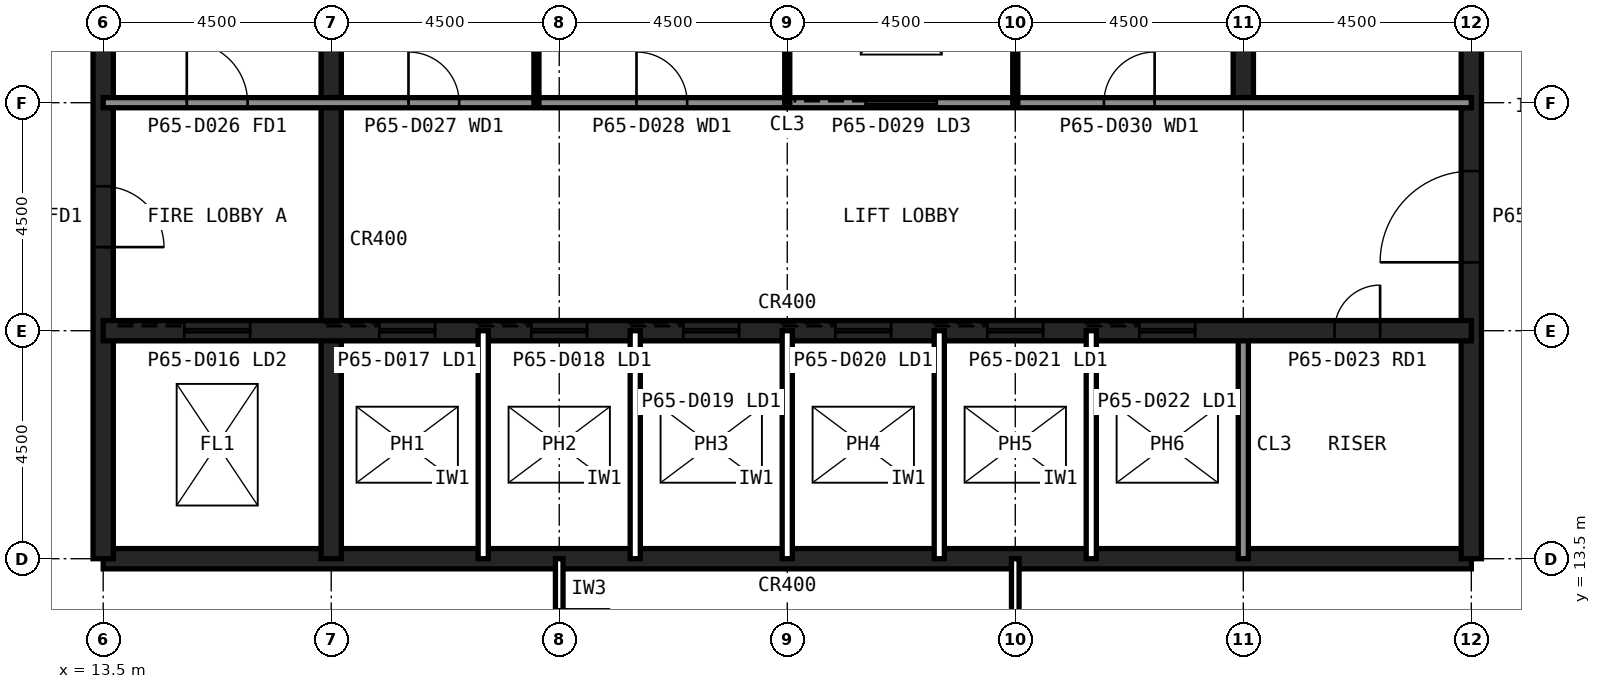
"""IFC4 building model, lengths in metres.
Left out: names, types, materials, properties, quantities, classifications, styles, units other than length and angle.
Written with IfcOpenShell. Run it as: python <this file> out.ifc"""

import sys

from ifc_helpers import new_model, si_unit, direction, frame, frame_2d, origin, place, context, subcontext, project, spatial, rectangle, extrude, element, fill, save


model = new_model("IFC4")
c1 = context("Model", 3, precision=1e-05, world=origin(), true_north=direction((0.0, 1.0)))
c2 = subcontext(c1, "Body", "Model", "MODEL_VIEW")
j1 = project(units=[si_unit("LENGTHUNIT", "METRE"), si_unit("PLANEANGLEUNIT", "RADIAN")], contexts=[c1])
p1 = place(None, origin())
s1 = spatial("IfcSite", under=j1, at=p1, CompositionType="ELEMENT")
p2 = place(p1, origin())
s2 = spatial("IfcBuilding", under=s1, at=p2, CompositionType="ELEMENT")
p3 = place(p2, frame((0.0, 0.0, 270.6)))
s3 = spatial("IfcBuildingStorey", under=s2, at=p3, CompositionType="ELEMENT", Elevation=270.6)
p4 = place(p3, frame((13.5, 13.5, 0.0), z_axis=(0.0, 0.0, 1.0), x_axis=(1.0, 0.0, 0.0)))
e1 = element("IfcWall", 1, at=p4, inside=s3, PredefinedType="SHEAR", context=c2, shape_type="SweptSolid", body=[
    extrude(rectangle(XDim=27.0, YDim=0.4, at=frame_2d((13.5, 0.0))), origin(), (0.0, 0.0, 1.0), 4.0),
])
p5 = place(p3, frame((40.5, 13.5, 0.0), z_axis=(0.0, 0.0, 1.0), x_axis=(0.0, 1.0, 0.0)))
e2 = element("IfcWall", 2, at=p5, inside=s3, PredefinedType="SHEAR", context=c2, shape_type="SweptSolid", body=[
    extrude(rectangle(XDim=27.0, YDim=0.4, at=frame_2d((13.5, 0.0))), origin(), (0.0, 0.0, 1.0), 4.0),
])
p6 = place(p5, frame((5.85, 0.0, 0.0)))
e3 = element("IfcOpeningElement", 3, at=p6, cuts=e2, PredefinedType="OPENING", context=c2, shape_type="SweptSolid", body=[
    extrude(rectangle(XDim=1.8, YDim=2.1, at=frame_2d((0.9, 1.05))), frame((0.0, 0.21, 0.0), z_axis=(0.0, -1.0, 0.0), x_axis=(1.0, 0.0, 0.0)), (0.0, 0.0, 1.0), 0.42),
])
p7 = place(p5, frame((19.65, 0.0, 0.0)))
e4 = element("IfcOpeningElement", 4, at=p7, cuts=e2, PredefinedType="OPENING", context=c2, shape_type="SweptSolid", body=[
    extrude(rectangle(XDim=1.2, YDim=2.1, at=frame_2d((0.6, 1.05))), frame((0.0, 0.21, 0.0), z_axis=(0.0, -1.0, 0.0), x_axis=(1.0, 0.0, 0.0)), (0.0, 0.0, 1.0), 0.42),
])
p8 = place(p3, frame((13.5, 40.5, 0.0), z_axis=(0.0, 0.0, 1.0), x_axis=(0.0, -1.0, 0.0)))
e5 = element("IfcWall", 5, at=p8, inside=s3, PredefinedType="SHEAR", context=c2, shape_type="SweptSolid", body=[
    extrude(rectangle(XDim=27.0, YDim=0.4, at=frame_2d((13.5, 0.0))), origin(), (0.0, 0.0, 1.0), 4.0),
])
p9 = place(p8, frame((19.65, 0.0, 0.0)))
e6 = element("IfcOpeningElement", 6, at=p9, cuts=e5, PredefinedType="OPENING", context=c2, shape_type="SweptSolid", body=[
    extrude(rectangle(XDim=1.2, YDim=2.1, at=frame_2d((0.6, 1.05))), frame((0.0, 0.21, 0.0), z_axis=(0.0, -1.0, 0.0), x_axis=(1.0, 0.0, 0.0)), (0.0, 0.0, 1.0), 0.42),
])
p10 = place(p8, frame((5.85, 0.0, 0.0)))
e7 = element("IfcOpeningElement", 7, at=p10, cuts=e5, PredefinedType="OPENING", context=c2, shape_type="SweptSolid", body=[
    extrude(rectangle(XDim=1.8, YDim=2.1, at=frame_2d((0.9, 1.05))), frame((0.0, 0.21, 0.0), z_axis=(0.0, -1.0, 0.0), x_axis=(1.0, 0.0, 0.0)), (0.0, 0.0, 1.0), 0.42),
])
p11 = place(p3, frame((18.0, 13.5, 0.0), z_axis=(0.0, 0.0, 1.0), x_axis=(0.0, 1.0, 0.0)))
e8 = element("IfcWall", 8, at=p11, inside=s3, PredefinedType="SHEAR", context=c2, shape_type="SweptSolid", body=[
    extrude(rectangle(XDim=18.0, YDim=0.4, at=frame_2d((9.0, 0.0))), origin(), (0.0, 0.0, 1.0), 4.0),
])
p12 = place(p3, frame((36.0, 13.5, 0.0), z_axis=(0.0, 0.0, 1.0), x_axis=(0.0, 1.0, 0.0)))
e9 = element("IfcWall", 9, at=p12, inside=s3, PredefinedType="SOLIDWALL", context=c2, shape_type="SweptSolid", body=[
    extrude(rectangle(XDim=4.5, YDim=0.2, at=frame_2d((2.25, 0.0))), origin(), (0.0, 0.0, 1.0), 3.84),
])
p13 = place(p3, frame((36.0, 22.5, 0.0), z_axis=(0.0, 0.0, 1.0), x_axis=(0.0, 1.0, 0.0)))
e10 = element("IfcWall", 10, at=p13, inside=s3, PredefinedType="SHEAR", context=c2, shape_type="SweptSolid", body=[
    extrude(rectangle(XDim=18.0, YDim=0.4, at=frame_2d((9.0, 0.0))), origin(), (0.0, 0.0, 1.0), 4.0),
])
p14 = place(p3, frame((13.5, 18.0, 0.0), z_axis=(0.0, 0.0, 1.0), x_axis=(1.0, 0.0, 0.0)))
e11 = element("IfcWall", 11, at=p14, inside=s3, PredefinedType="SHEAR", context=c2, shape_type="SweptSolid", body=[
    extrude(rectangle(XDim=27.0, YDim=0.4, at=frame_2d((13.5, 0.0))), origin(), (0.0, 0.0, 1.0), 4.0),
])
p15 = place(p14, frame((24.3, 0.0, 0.0)))
e12 = element("IfcOpeningElement", 12, at=p15, cuts=e11, PredefinedType="OPENING", context=c2, shape_type="SweptSolid", body=[
    extrude(rectangle(XDim=0.9, YDim=2.1, at=frame_2d((0.45, 1.05))), frame((0.0, 0.21, 0.0), z_axis=(0.0, -1.0, 0.0), x_axis=(1.0, 0.0, 0.0)), (0.0, 0.0, 1.0), 0.42),
])
p16 = place(p14, frame((5.45, 0.0, 0.0)))
e13 = element("IfcOpeningElement", 13, at=p16, cuts=e11, PredefinedType="OPENING", context=c2, shape_type="SweptSolid", body=[
    extrude(rectangle(XDim=1.1, YDim=2.1, at=frame_2d((0.55, 1.05))), frame((0.0, 0.21, 0.0), z_axis=(0.0, -1.0, 0.0), x_axis=(1.0, 0.0, 0.0)), (0.0, 0.0, 1.0), 0.42),
])
p17 = place(p14, frame((8.45, 0.0, 0.0)))
e14 = element("IfcOpeningElement", 14, at=p17, cuts=e11, PredefinedType="OPENING", context=c2, shape_type="SweptSolid", body=[
    extrude(rectangle(XDim=1.1, YDim=2.1, at=frame_2d((0.55, 1.05))), frame((0.0, 0.21, 0.0), z_axis=(0.0, -1.0, 0.0), x_axis=(1.0, 0.0, 0.0)), (0.0, 0.0, 1.0), 0.42),
])
p18 = place(p14, frame((11.45, 0.0, 0.0)))
e15 = element("IfcOpeningElement", 15, at=p18, cuts=e11, PredefinedType="OPENING", context=c2, shape_type="SweptSolid", body=[
    extrude(rectangle(XDim=1.1, YDim=2.1, at=frame_2d((0.55, 1.05))), frame((0.0, 0.21, 0.0), z_axis=(0.0, -1.0, 0.0), x_axis=(1.0, 0.0, 0.0)), (0.0, 0.0, 1.0), 0.42),
])
p19 = place(p14, frame((14.45, 0.0, 0.0)))
e16 = element("IfcOpeningElement", 16, at=p19, cuts=e11, PredefinedType="OPENING", context=c2, shape_type="SweptSolid", body=[
    extrude(rectangle(XDim=1.1, YDim=2.1, at=frame_2d((0.55, 1.05))), frame((0.0, 0.21, 0.0), z_axis=(0.0, -1.0, 0.0), x_axis=(1.0, 0.0, 0.0)), (0.0, 0.0, 1.0), 0.42),
])
p20 = place(p14, frame((17.45, 0.0, 0.0)))
e17 = element("IfcOpeningElement", 17, at=p20, cuts=e11, PredefinedType="OPENING", context=c2, shape_type="SweptSolid", body=[
    extrude(rectangle(XDim=1.1, YDim=2.1, at=frame_2d((0.55, 1.05))), frame((0.0, 0.21, 0.0), z_axis=(0.0, -1.0, 0.0), x_axis=(1.0, 0.0, 0.0)), (0.0, 0.0, 1.0), 0.42),
])
p21 = place(p14, frame((20.45, 0.0, 0.0)))
e18 = element("IfcOpeningElement", 18, at=p21, cuts=e11, PredefinedType="OPENING", context=c2, shape_type="SweptSolid", body=[
    extrude(rectangle(XDim=1.1, YDim=2.1, at=frame_2d((0.55, 1.05))), frame((0.0, 0.21, 0.0), z_axis=(0.0, -1.0, 0.0), x_axis=(1.0, 0.0, 0.0)), (0.0, 0.0, 1.0), 0.42),
])
p22 = place(p14, frame((1.6, 0.0, 0.0)))
e19 = element("IfcOpeningElement", 19, at=p22, cuts=e11, PredefinedType="OPENING", context=c2, shape_type="SweptSolid", body=[
    extrude(rectangle(XDim=1.3, YDim=2.2, at=frame_2d((0.65, 1.1))), frame((0.0, 0.21, 0.0), z_axis=(0.0, -1.0, 0.0), x_axis=(1.0, 0.0, 0.0)), (0.0, 0.0, 1.0), 0.42),
])
p23 = place(p3, frame((13.5, 22.5, 0.0), z_axis=(0.0, 0.0, 1.0), x_axis=(1.0, 0.0, 0.0)))
e20 = element("IfcWall", 20, at=p23, inside=s3, PredefinedType="SOLIDWALL", context=c2, shape_type="SweptSolid", body=[
    extrude(rectangle(XDim=27.0, YDim=0.2, at=frame_2d((13.5, 0.0))), origin(), (0.0, 0.0, 1.0), 3.84),
])
p24 = place(p23, frame((1.65, 0.0, 0.0)))
e21 = element("IfcOpeningElement", 21, at=p24, cuts=e20, PredefinedType="OPENING", context=c2, shape_type="SweptSolid", body=[
    extrude(rectangle(XDim=1.2, YDim=2.1, at=frame_2d((0.6, 1.05))), frame((0.0, 0.11, 0.0), z_axis=(0.0, -1.0, 0.0), x_axis=(1.0, 0.0, 0.0)), (0.0, 0.0, 1.0), 0.22),
])
p25 = place(p23, frame((6.025, 0.0, 0.0)))
e22 = element("IfcOpeningElement", 22, at=p25, cuts=e20, PredefinedType="OPENING", context=c2, shape_type="SweptSolid", body=[
    extrude(rectangle(XDim=1.0, YDim=2.1, at=frame_2d((0.5, 1.05))), frame((0.0, 0.11, 0.0), z_axis=(0.0, -1.0, 0.0), x_axis=(1.0, 0.0, 0.0)), (0.0, 0.0, 1.0), 0.22),
])
p26 = place(p23, frame((10.525, 0.0, 0.0)))
e23 = element("IfcOpeningElement", 23, at=p26, cuts=e20, PredefinedType="OPENING", context=c2, shape_type="SweptSolid", body=[
    extrude(rectangle(XDim=1.0, YDim=2.1, at=frame_2d((0.5, 1.05))), frame((0.0, 0.11, 0.0), z_axis=(0.0, -1.0, 0.0), x_axis=(1.0, 0.0, 0.0)), (0.0, 0.0, 1.0), 0.22),
])
p27 = place(p23, frame((19.75, 0.0, 0.0)))
e24 = element("IfcOpeningElement", 24, at=p27, cuts=e20, PredefinedType="OPENING", context=c2, shape_type="SweptSolid", body=[
    extrude(rectangle(XDim=1.0, YDim=2.1, at=frame_2d((0.5, 1.05))), frame((0.0, 0.11, 0.0), z_axis=(0.0, -1.0, 0.0), x_axis=(1.0, 0.0, 0.0)), (0.0, 0.0, 1.0), 0.22),
])
p28 = place(p23, frame((15.05, 0.0, 0.0)))
e25 = element("IfcOpeningElement", 25, at=p28, cuts=e20, PredefinedType="OPENING", context=c2, shape_type="SweptSolid", body=[
    extrude(rectangle(XDim=1.4, YDim=2.4, at=frame_2d((0.7, 1.2))), frame((0.0, 0.11, 0.0), z_axis=(0.0, -1.0, 0.0), x_axis=(1.0, 0.0, 0.0)), (0.0, 0.0, 1.0), 0.22),
])
for number, where, z_axis, x_axis in (
    (26, (21.0, 13.5, 0.0), (0.0, 0.0, 1.0), (0.0, 1.0, 0.0)),
    (27, (24.0, 13.5, 0.0), (0.0, 0.0, 1.0), (0.0, 1.0, 0.0)),
    (28, (27.0, 13.5, 0.0), (0.0, 0.0, 1.0), (0.0, 1.0, 0.0)),
    (29, (30.0, 13.5, 0.0), (0.0, 0.0, 1.0), (0.0, 1.0, 0.0)),
    (30, (33.0, 13.5, 0.0), (0.0, 0.0, 1.0), (0.0, 1.0, 0.0)),
):
    element("IfcWall", number, at=place(p3, frame(where, z_axis=z_axis, x_axis=x_axis)), inside=s3, PredefinedType="PARTITIONING", context=c2, shape_type="SweptSolid", body=[
        extrude(rectangle(XDim=4.5, YDim=0.2, at=frame_2d((2.25, 0.0))), origin(), (0.0, 0.0, 1.0), 3.84),
    ])
for number, where, z_axis, x_axis in (
    (31, (22.05, 22.5, 0.0), (0.0, 0.0, 1.0), (0.0, 1.0, 0.0)),
    (32, (27.0, 22.5, 0.0), (0.0, 0.0, 1.0), (0.0, 1.0, 0.0)),
    (33, (31.5, 22.5, 0.0), (0.0, 0.0, 1.0), (0.0, 1.0, 0.0)),
):
    element("IfcWall", number, at=place(p3, frame(where, z_axis=z_axis, x_axis=x_axis)), inside=s3, PredefinedType="PLUMBINGWALL", context=c2, shape_type="SweptSolid", body=[
        extrude(rectangle(XDim=9.0, YDim=0.1, at=frame_2d((4.5, 0.0))), origin(), (0.0, 0.0, 1.0), 3.84),
    ])
p29 = place(p3, frame((31.5, 10.5, 0.0), z_axis=(0.0, 0.0, 1.0), x_axis=(0.0, 1.0, 0.0)))
e34 = element("IfcWall", 34, at=p29, inside=s3, PredefinedType="PARTITIONING", context=c2, shape_type="SweptSolid", body=[
    extrude(rectangle(XDim=3.0, YDim=0.15, at=frame_2d((1.5, 0.0))), origin(), (0.0, 0.0, 1.0), 2.989),
])
p30 = place(p3, frame((22.5, 13.5, 0.0), z_axis=(0.0, 0.0, 1.0), x_axis=(0.0, -1.0, 0.0)))
e35 = element("IfcWall", 35, at=p30, inside=s3, PredefinedType="PARTITIONING", context=c2, shape_type="SweptSolid", body=[
    extrude(rectangle(XDim=3.0, YDim=0.15, at=frame_2d((1.5, 0.0))), origin(), (0.0, 0.0, 1.0), 2.989),
])
p31 = place(p30, frame((1.0, 0.0, 0.0)))
e36 = element("IfcOpeningElement", 36, at=p31, cuts=e35, PredefinedType="OPENING", context=c2, shape_type="SweptSolid", body=[
    extrude(rectangle(XDim=1.0, YDim=2.1, at=frame_2d((0.5, 1.05))), frame((0.0, 0.085, 0.0), z_axis=(0.0, -1.0, 0.0), x_axis=(1.0, 0.0, 0.0)), (0.0, 0.0, 1.0), 0.17),
])
p32 = place(p9, origin())
e37 = element("IfcDoor", 37, at=p32, inside=s3, OperationType="SINGLE_SWING_RIGHT", PredefinedType="DOOR", context=c2, shape_type="SweptSolid", body=[
    extrude(rectangle(XDim=1.2, YDim=2.1, at=frame_2d((0.6, 1.05))), frame((0.0, 0.025, 0.0), z_axis=(0.0, -1.0, 0.0), x_axis=(1.0, 0.0, 0.0)), (0.0, 0.0, 1.0), 0.05),
])
fill(e6, e37)
p33 = place(p6, origin())
e38 = element("IfcDoor", 38, at=p33, inside=s3, OperationType="SINGLE_SWING_LEFT", PredefinedType="DOOR", context=c2, shape_type="SweptSolid", body=[
    extrude(rectangle(XDim=1.8, YDim=2.1, at=frame_2d((0.9, 1.05))), frame((0.0, 0.025, 0.0), z_axis=(0.0, -1.0, 0.0), x_axis=(1.0, 0.0, 0.0)), (0.0, 0.0, 1.0), 0.05),
])
fill(e3, e38)
p34 = place(p24, origin())
e39 = element("IfcDoor", 39, at=p34, inside=s3, OperationType="SINGLE_SWING_LEFT", PredefinedType="DOOR", context=c2, shape_type="SweptSolid", body=[
    extrude(rectangle(XDim=1.2, YDim=2.1, at=frame_2d((0.6, 1.05))), frame((0.0, 0.025, 0.0), z_axis=(0.0, -1.0, 0.0), x_axis=(1.0, 0.0, 0.0)), (0.0, 0.0, 1.0), 0.05),
])
fill(e21, e39)
p35 = place(p25, origin())
e40 = element("IfcDoor", 40, at=p35, inside=s3, OperationType="SINGLE_SWING_LEFT", PredefinedType="DOOR", context=c2, shape_type="SweptSolid", body=[
    extrude(rectangle(XDim=1.0, YDim=2.1, at=frame_2d((0.5, 1.05))), frame((0.0, 0.025, 0.0), z_axis=(0.0, -1.0, 0.0), x_axis=(1.0, 0.0, 0.0)), (0.0, 0.0, 1.0), 0.05),
])
fill(e22, e40)
p36 = place(p26, origin())
e41 = element("IfcDoor", 41, at=p36, inside=s3, OperationType="SINGLE_SWING_LEFT", PredefinedType="DOOR", context=c2, shape_type="SweptSolid", body=[
    extrude(rectangle(XDim=1.0, YDim=2.1, at=frame_2d((0.5, 1.05))), frame((0.0, 0.025, 0.0), z_axis=(0.0, -1.0, 0.0), x_axis=(1.0, 0.0, 0.0)), (0.0, 0.0, 1.0), 0.05),
])
fill(e23, e41)
p37 = place(p27, origin())
e42 = element("IfcDoor", 42, at=p37, inside=s3, OperationType="SINGLE_SWING_RIGHT", PredefinedType="DOOR", context=c2, shape_type="SweptSolid", body=[
    extrude(rectangle(XDim=1.0, YDim=2.1, at=frame_2d((0.5, 1.05))), frame((0.0, 0.025, 0.0), z_axis=(0.0, -1.0, 0.0), x_axis=(1.0, 0.0, 0.0)), (0.0, 0.0, 1.0), 0.05),
])
fill(e24, e42)
p38 = place(p15, origin())
e43 = element("IfcDoor", 43, at=p38, inside=s3, OperationType="SINGLE_SWING_RIGHT", PredefinedType="DOOR", context=c2, shape_type="SweptSolid", body=[
    extrude(rectangle(XDim=0.9, YDim=2.1, at=frame_2d((0.45, 1.05))), frame((0.0, 0.025, 0.0), z_axis=(0.0, -1.0, 0.0), x_axis=(1.0, 0.0, 0.0)), (0.0, 0.0, 1.0), 0.05),
])
fill(e12, e43)
p39 = place(p16, origin())
e44 = element("IfcDoor", 44, at=p39, inside=s3, OperationType="SLIDING_TO_LEFT", PredefinedType="DOOR", context=c2, shape_type="SweptSolid", body=[
    extrude(rectangle(XDim=1.1, YDim=2.1, at=frame_2d((0.55, 1.05))), frame((0.0, 0.025, 0.0), z_axis=(0.0, -1.0, 0.0), x_axis=(1.0, 0.0, 0.0)), (0.0, 0.0, 1.0), 0.05),
])
fill(e13, e44)
p40 = place(p17, origin())
e45 = element("IfcDoor", 45, at=p40, inside=s3, OperationType="SLIDING_TO_LEFT", PredefinedType="DOOR", context=c2, shape_type="SweptSolid", body=[
    extrude(rectangle(XDim=1.1, YDim=2.1, at=frame_2d((0.55, 1.05))), frame((0.0, 0.025, 0.0), z_axis=(0.0, -1.0, 0.0), x_axis=(1.0, 0.0, 0.0)), (0.0, 0.0, 1.0), 0.05),
])
fill(e14, e45)
p41 = place(p18, origin())
e46 = element("IfcDoor", 46, at=p41, inside=s3, OperationType="SLIDING_TO_LEFT", PredefinedType="DOOR", context=c2, shape_type="SweptSolid", body=[
    extrude(rectangle(XDim=1.1, YDim=2.1, at=frame_2d((0.55, 1.05))), frame((0.0, 0.025, 0.0), z_axis=(0.0, -1.0, 0.0), x_axis=(1.0, 0.0, 0.0)), (0.0, 0.0, 1.0), 0.05),
])
fill(e15, e46)
p42 = place(p19, origin())
e47 = element("IfcDoor", 47, at=p42, inside=s3, OperationType="SLIDING_TO_LEFT", PredefinedType="DOOR", context=c2, shape_type="SweptSolid", body=[
    extrude(rectangle(XDim=1.1, YDim=2.1, at=frame_2d((0.55, 1.05))), frame((0.0, 0.025, 0.0), z_axis=(0.0, -1.0, 0.0), x_axis=(1.0, 0.0, 0.0)), (0.0, 0.0, 1.0), 0.05),
])
fill(e16, e47)
p43 = place(p20, origin())
e48 = element("IfcDoor", 48, at=p43, inside=s3, OperationType="SLIDING_TO_LEFT", PredefinedType="DOOR", context=c2, shape_type="SweptSolid", body=[
    extrude(rectangle(XDim=1.1, YDim=2.1, at=frame_2d((0.55, 1.05))), frame((0.0, 0.025, 0.0), z_axis=(0.0, -1.0, 0.0), x_axis=(1.0, 0.0, 0.0)), (0.0, 0.0, 1.0), 0.05),
])
fill(e17, e48)
p44 = place(p21, origin())
e49 = element("IfcDoor", 49, at=p44, inside=s3, OperationType="SLIDING_TO_LEFT", PredefinedType="DOOR", context=c2, shape_type="SweptSolid", body=[
    extrude(rectangle(XDim=1.1, YDim=2.1, at=frame_2d((0.55, 1.05))), frame((0.0, 0.025, 0.0), z_axis=(0.0, -1.0, 0.0), x_axis=(1.0, 0.0, 0.0)), (0.0, 0.0, 1.0), 0.05),
])
fill(e18, e49)
p45 = place(p22, origin())
e50 = element("IfcDoor", 50, at=p45, inside=s3, OperationType="SLIDING_TO_LEFT", PredefinedType="DOOR", context=c2, shape_type="SweptSolid", body=[
    extrude(rectangle(XDim=1.3, YDim=2.2, at=frame_2d((0.65, 1.1))), frame((0.0, 0.025, 0.0), z_axis=(0.0, -1.0, 0.0), x_axis=(1.0, 0.0, 0.0)), (0.0, 0.0, 1.0), 0.05),
])
fill(e19, e50)
p46 = place(p28, origin())
e51 = element("IfcDoor", 51, at=p46, inside=s3, OperationType="SLIDING_TO_LEFT", PredefinedType="DOOR", context=c2, shape_type="SweptSolid", body=[
    extrude(rectangle(XDim=1.4, YDim=2.4, at=frame_2d((0.7, 1.2))), frame((0.0, 0.025, 0.0), z_axis=(0.0, -1.0, 0.0), x_axis=(1.0, 0.0, 0.0)), (0.0, 0.0, 1.0), 0.05),
])
fill(e25, e51)
save(model, sys.argv[1])
